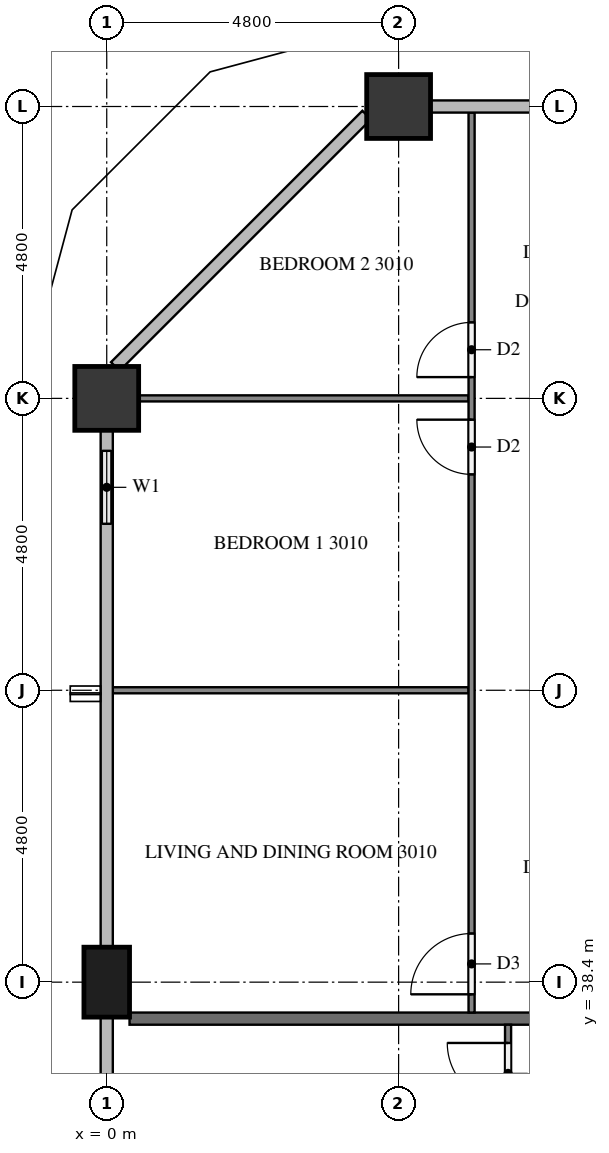
"""IFC4 building model, lengths in metres.
Left out: names, types, materials, properties, quantities, classifications, styles, units other than length and angle.
Written with IfcOpenShell. Run it as: python <this file> out.ifc"""

import sys

from ifc_helpers import new_model, si_unit, direction, frame, frame_2d, origin, origin_2d, place, context, subcontext, project, spatial, rectangle, extrude, element, fill, save


model = new_model("IFC4")
c1 = context("Model", 3, precision=1e-05, world=origin(), true_north=direction((0.0, 1.0)))
c2 = subcontext(c1, "Body", "Model", "MODEL_VIEW")
j1 = project(units=[si_unit("LENGTHUNIT", "METRE"), si_unit("PLANEANGLEUNIT", "RADIAN")], contexts=[c1])
p1 = place(None, origin())
s1 = spatial("IfcSite", under=j1, at=p1, CompositionType="ELEMENT")
p2 = place(p1, origin())
s2 = spatial("IfcBuilding", under=s1, at=p2, CompositionType="ELEMENT")
p3 = place(p2, frame((0.0, 0.0, 119.1)))
s3 = spatial("IfcBuildingStorey", under=s2, at=p3, CompositionType="ELEMENT", Elevation=119.1)
for number, where, z_axis, x_axis in (
    (1, (4.8, 52.8, 0.0), (0.0, 0.0, 1.0), (1.0, 0.0, 0.0)),
    (2, (0.0, 48.0, 0.0), (0.0, 0.0, 1.0), (1.0, 0.0, 0.0)),
):
    element("IfcColumn", number, at=place(p3, frame(where, z_axis=z_axis, x_axis=x_axis)), inside=s3, PredefinedType="COLUMN", context=c2, shape_type="SweptSolid", body=[
        extrude(rectangle(XDim=1.05, YDim=1.05, at=origin_2d()), origin(), (0.0, 0.0, 1.0), 3.2),
    ])
p4 = place(p3, frame((0.0, 38.4, 0.0), z_axis=(0.0, 0.0, 1.0), x_axis=(0.0, 1.0, 0.0)))
e3 = element("IfcColumn", 3, at=p4, inside=s3, PredefinedType="COLUMN", context=c2, shape_type="SweptSolid", body=[
    extrude(rectangle(XDim=1.15, YDim=0.75, at=origin_2d()), origin(), (0.0, 0.0, 1.0), 3.2),
])
p5 = place(p3, frame((0.0, 47.475, 0.0), z_axis=(0.0, 0.0, 1.0), x_axis=(0.0, -1.0, 0.0)))
e4 = element("IfcWall", 4, at=p5, inside=s3, PredefinedType="SOLIDWALL", context=c2, shape_type="SweptSolid", body=[
    extrude(rectangle(XDim=1.875, YDim=0.15, at=frame_2d((0.938, 0.0))), origin(), (0.0, 0.0, 1.0), 3.2),
])
p6 = place(p5, frame((0.337, 0.0, 0.9)))
e5 = element("IfcOpeningElement", 5, at=p6, cuts=e4, PredefinedType="OPENING", context=c2, shape_type="SweptSolid", body=[
    extrude(rectangle(XDim=1.2, YDim=1.4, at=frame_2d((0.6, 0.7))), frame((0.0, 0.085, 0.0), z_axis=(0.0, -1.0, 0.0), x_axis=(1.0, 0.0, 0.0)), (0.0, 0.0, 1.0), 0.17),
])
p7 = place(p3, frame((0.375, 37.8, 0.0), z_axis=(0.0, 0.0, 1.0), x_axis=(1.0, 0.0, 0.0)))
e6 = element("IfcWall", 6, at=p7, inside=s3, PredefinedType="PARTITIONING", context=c2, shape_type="SweptSolid", body=[
    extrude(rectangle(XDim=9.525, YDim=0.2, at=frame_2d((4.762, 0.0))), origin(), (0.0, 0.0, 1.0), 3.2),
])
p8 = place(p3, frame((5.95, 43.2, 0.0), z_axis=(0.0, 0.0, 1.0), x_axis=(-1.0, 0.0, 0.0)))
e7 = element("IfcWall", 7, at=p8, inside=s3, PredefinedType="PARTITIONING", context=c2, shape_type="SweptSolid", body=[
    extrude(rectangle(XDim=5.85, YDim=0.1, at=frame_2d((2.925, 0.0))), origin(), (0.0, 0.0, 1.0), 3.2),
])
p9 = place(p3, frame((5.95, 48.0, 0.0), z_axis=(0.0, 0.0, 1.0), x_axis=(-1.0, 0.0, 0.0)))
e8 = element("IfcWall", 8, at=p9, inside=s3, PredefinedType="PARTITIONING", context=c2, shape_type="SweptSolid", body=[
    extrude(rectangle(XDim=5.425, YDim=0.1, at=frame_2d((2.712, 0.0))), origin(), (0.0, 0.0, 1.0), 3.2),
])
p10 = place(p3, frame((6.0, 37.9, 0.0), z_axis=(0.0, 0.0, 1.0), x_axis=(0.0, 1.0, 0.0)))
e9 = element("IfcWall", 9, at=p10, inside=s3, PredefinedType="PARTITIONING", context=c2, shape_type="SweptSolid", body=[
    extrude(rectangle(XDim=14.8, YDim=0.1, at=frame_2d((7.4, 0.0))), origin(), (0.0, 0.0, 1.0), 3.2),
])
p11 = place(p10, frame((0.3, 0.0, 0.0)))
e10 = element("IfcOpeningElement", 10, at=p11, cuts=e9, PredefinedType="OPENING", context=c2, shape_type="SweptSolid", body=[
    extrude(rectangle(XDim=1.0, YDim=2.1, at=frame_2d((0.5, 1.05))), frame((0.0, 0.06, 0.0), z_axis=(0.0, -1.0, 0.0), x_axis=(1.0, 0.0, 0.0)), (0.0, 0.0, 1.0), 0.12),
])
p12 = place(p10, frame((8.85, 0.0, 0.0)))
e11 = element("IfcOpeningElement", 11, at=p12, cuts=e9, PredefinedType="OPENING", context=c2, shape_type="SweptSolid", body=[
    extrude(rectangle(XDim=0.9, YDim=2.1, at=frame_2d((0.45, 1.05))), frame((0.0, 0.06, 0.0), z_axis=(0.0, -1.0, 0.0), x_axis=(1.0, 0.0, 0.0)), (0.0, 0.0, 1.0), 0.12),
])
p13 = place(p10, frame((10.45, 0.0, 0.0)))
e12 = element("IfcOpeningElement", 12, at=p13, cuts=e9, PredefinedType="OPENING", context=c2, shape_type="SweptSolid", body=[
    extrude(rectangle(XDim=0.9, YDim=2.1, at=frame_2d((0.45, 1.05))), frame((0.0, 0.06, 0.0), z_axis=(0.0, -1.0, 0.0), x_axis=(1.0, 0.0, 0.0)), (0.0, 0.0, 1.0), 0.12),
])
p14 = place(p3, frame((6.6, 28.9, 0.0), z_axis=(0.0, 0.0, 1.0), x_axis=(0.0, 1.0, 0.0)))
e13 = element("IfcWall", 13, at=p14, inside=s3, PredefinedType="PARTITIONING", context=c2, shape_type="SweptSolid", body=[
    extrude(rectangle(XDim=8.8, YDim=0.1, at=frame_2d((4.4, 0.0))), origin(), (0.0, 0.0, 1.0), 3.2),
])
p15 = place(p14, frame((7.5, 0.0, 0.0)))
e14 = element("IfcOpeningElement", 14, at=p15, cuts=e13, PredefinedType="OPENING", context=c2, shape_type="SweptSolid", body=[
    extrude(rectangle(XDim=1.0, YDim=2.1, at=frame_2d((0.5, 1.05))), frame((0.0, 0.06, 0.0), z_axis=(0.0, -1.0, 0.0), x_axis=(1.0, 0.0, 0.0)), (0.0, 0.0, 1.0), 0.12),
])
p16 = place(p14, frame((0.3, 0.0, 0.0)))
e15 = element("IfcOpeningElement", 15, at=p16, cuts=e13, PredefinedType="OPENING", context=c2, shape_type="SweptSolid", body=[
    extrude(rectangle(XDim=0.9, YDim=2.1, at=frame_2d((0.45, 1.05))), frame((0.0, 0.06, 0.0), z_axis=(0.0, -1.0, 0.0), x_axis=(1.0, 0.0, 0.0)), (0.0, 0.0, 1.0), 0.12),
])
p17 = place(p6, origin())
e16 = element("IfcWindow", 16, at=p17, inside=s3, PartitioningType="SINGLE_PANEL", PredefinedType="WINDOW", context=c2, shape_type="SweptSolid", body=[
    extrude(rectangle(XDim=1.2, YDim=1.4, at=frame_2d((0.6, 0.7))), frame((0.0, 0.03, 0.0), z_axis=(0.0, -1.0, 0.0), x_axis=(1.0, 0.0, 0.0)), (0.0, 0.0, 1.0), 0.06),
])
fill(e5, e16)
p18 = place(p11, origin())
e17 = element("IfcDoor", 17, at=p18, inside=s3, OperationType="SINGLE_SWING_LEFT", PredefinedType="DOOR", context=c2, shape_type="SweptSolid", body=[
    extrude(rectangle(XDim=1.0, YDim=2.1, at=frame_2d((0.5, 1.05))), frame((0.0, 0.025, 0.0), z_axis=(0.0, -1.0, 0.0), x_axis=(1.0, 0.0, 0.0)), (0.0, 0.0, 1.0), 0.05),
])
fill(e10, e17)
p19 = place(p12, origin())
e18 = element("IfcDoor", 18, at=p19, inside=s3, OperationType="SINGLE_SWING_RIGHT", PredefinedType="DOOR", context=c2, shape_type="SweptSolid", body=[
    extrude(rectangle(XDim=0.9, YDim=2.1, at=frame_2d((0.45, 1.05))), frame((0.0, 0.025, 0.0), z_axis=(0.0, -1.0, 0.0), x_axis=(1.0, 0.0, 0.0)), (0.0, 0.0, 1.0), 0.05),
])
fill(e11, e18)
p20 = place(p13, origin())
e19 = element("IfcDoor", 19, at=p20, inside=s3, OperationType="SINGLE_SWING_LEFT", PredefinedType="DOOR", context=c2, shape_type="SweptSolid", body=[
    extrude(rectangle(XDim=0.9, YDim=2.1, at=frame_2d((0.45, 1.05))), frame((0.0, 0.025, 0.0), z_axis=(0.0, -1.0, 0.0), x_axis=(1.0, 0.0, 0.0)), (0.0, 0.0, 1.0), 0.05),
])
fill(e12, e19)
p21 = place(p15, origin())
e20 = element("IfcDoor", 20, at=p21, inside=s3, OperationType="SINGLE_SWING_RIGHT", PredefinedType="DOOR", context=c2, shape_type="SweptSolid", body=[
    extrude(rectangle(XDim=1.0, YDim=2.1, at=frame_2d((0.5, 1.05))), frame((0.0, 0.025, 0.0), z_axis=(0.0, -1.0, 0.0), x_axis=(1.0, 0.0, 0.0)), (0.0, 0.0, 1.0), 0.05),
])
fill(e14, e20)
save(model, sys.argv[1])
